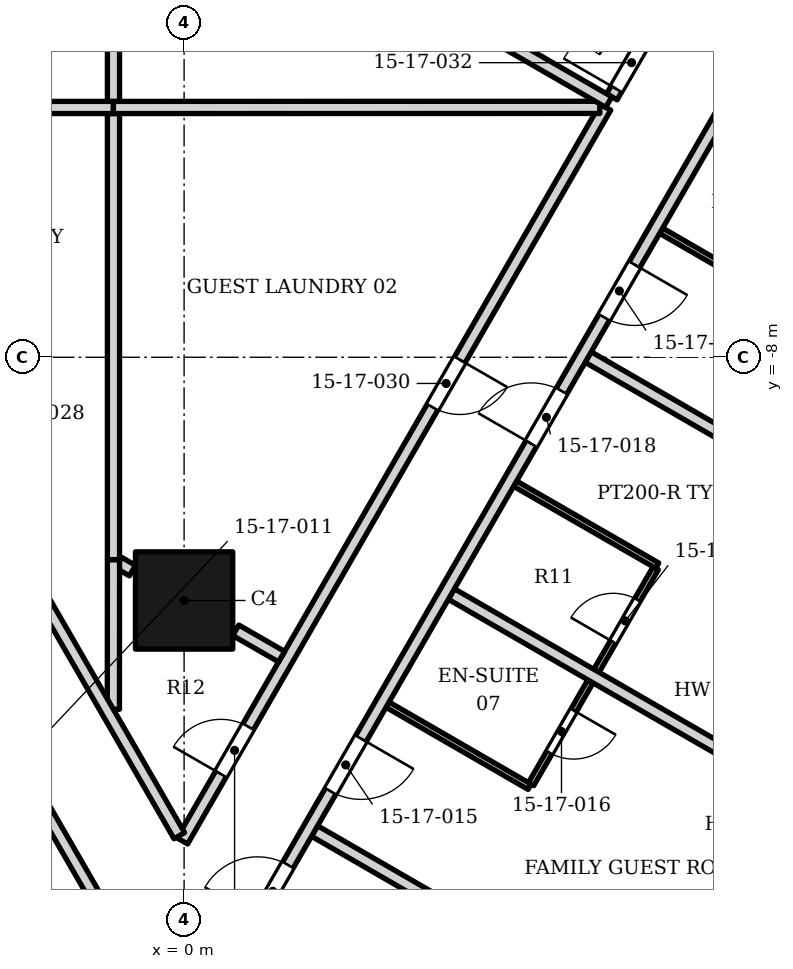
"""IFC4 building model, lengths in metres.
Left out: names, types, materials, properties, quantities, classifications, styles, units other than length and angle.
Written with IfcOpenShell. Run it as: python <this file> out.ifc"""

import sys

from ifc_helpers import new_model, si_unit, direction, frame, frame_2d, origin, origin_2d, place, context, subcontext, project, spatial, rectangle, extrude, element, fill, save


model = new_model("IFC4")
c1 = context("Model", 3, precision=1e-05, world=origin(), true_north=direction((0.0, 1.0)))
c2 = subcontext(c1, "Body", "Model", "MODEL_VIEW")
j1 = project(units=[si_unit("LENGTHUNIT", "METRE"), si_unit("PLANEANGLEUNIT", "RADIAN")], contexts=[c1])
p1 = place(None, origin())
s1 = spatial("IfcSite", under=j1, at=p1, CompositionType="ELEMENT")
p2 = place(p1, origin())
s2 = spatial("IfcBuilding", under=s1, at=p2, CompositionType="ELEMENT")
p3 = place(p2, frame((0.0, 0.0, 76.6)))
s3 = spatial("IfcBuildingStorey", under=s2, at=p3, CompositionType="ELEMENT", Elevation=76.6)
p4 = place(p3, frame((0.0, -12.0, 0.0), z_axis=(0.0, 0.0, 1.0), x_axis=(1.0, 0.0, 0.0)))
e1 = element("IfcColumn", 1, at=p4, inside=s3, PredefinedType="COLUMN", context=c2, shape_type="SweptSolid", body=[
    extrude(rectangle(XDim=1.6, YDim=1.6, at=origin_2d()), origin(), (0.0, 0.0, 1.0), 3.4),
])
p5 = place(p3, frame((8.714, -19.413, 0.0), z_axis=(0.0, 0.0, 1.0), x_axis=(0.500027713859, 0.866009402589, 0.0)))
e2 = element("IfcWall", 2, at=p5, inside=s3, PredefinedType="ELEMENTEDWALL", context=c2, shape_type="SweptSolid", body=[
    extrude(rectangle(XDim=4.2, YDim=0.2, at=frame_2d((2.1, 0.0))), origin(), (0.0, 0.0, 1.0), 2.628),
])
p6 = place(p5, frame((0.3, 0.0, 0.6)))
e3 = element("IfcOpeningElement", 3, at=p6, cuts=e2, PredefinedType="OPENING", context=c2, shape_type="SweptSolid", body=[
    extrude(rectangle(XDim=2.1, YDim=1.8, at=frame_2d((1.05, 0.9))), frame((0.0, 0.11, 0.0), z_axis=(0.0, -1.0, 0.0), x_axis=(1.0, 0.0, 0.0)), (0.0, 0.0, 1.0), 0.22),
])
p7 = place(p5, frame((2.7, 0.0, 0.0)))
e4 = element("IfcOpeningElement", 4, at=p7, cuts=e2, PredefinedType="OPENING", context=c2, shape_type="SweptSolid", body=[
    extrude(rectangle(XDim=1.2, YDim=2.4, at=frame_2d((0.6, 1.2))), frame((0.0, 0.11, 0.0), z_axis=(0.0, -1.0, 0.0), x_axis=(1.0, 0.0, 0.0)), (0.0, 0.0, 1.0), 0.22),
])
p8 = place(p3, frame((-11.206, 0.0, 0.0), z_axis=(0.0, 0.0, 1.0), x_axis=(0.500002959525, -0.866023695095, 0.0)))
e5 = element("IfcWall", 5, at=p8, inside=s3, PredefinedType="PARTITIONING", context=c2, shape_type="SweptSolid", body=[
    extrude(rectangle(XDim=22.351, YDim=0.2, at=frame_2d((11.175, 0.0))), origin(), (0.0, 0.0, 1.0), 2.242),
])
p9 = place(p8, frame((0.7, 0.0, 0.0)))
e6 = element("IfcOpeningElement", 6, at=p9, cuts=e5, PredefinedType="OPENING", context=c2, shape_type="SweptSolid", body=[
    extrude(rectangle(XDim=1.0, YDim=2.1, at=frame_2d((0.5, 1.05))), frame((0.0, 0.11, 0.0), z_axis=(0.0, -1.0, 0.0), x_axis=(1.0, 0.0, 0.0)), (0.0, 0.0, 1.0), 0.22),
])
p10 = place(p8, frame((3.1, 0.0, 0.0)))
e7 = element("IfcOpeningElement", 7, at=p10, cuts=e5, PredefinedType="OPENING", context=c2, shape_type="SweptSolid", body=[
    extrude(rectangle(XDim=1.0, YDim=2.1, at=frame_2d((0.5, 1.05))), frame((0.0, 0.11, 0.0), z_axis=(0.0, -1.0, 0.0), x_axis=(1.0, 0.0, 0.0)), (0.0, 0.0, 1.0), 0.22),
])
p11 = place(p8, frame((9.7, 0.0, 0.0)))
e8 = element("IfcOpeningElement", 8, at=p11, cuts=e5, PredefinedType="OPENING", context=c2, shape_type="SweptSolid", body=[
    extrude(rectangle(XDim=1.0, YDim=2.1, at=frame_2d((0.5, 1.05))), frame((0.0, 0.11, 0.0), z_axis=(0.0, -1.0, 0.0), x_axis=(1.0, 0.0, 0.0)), (0.0, 0.0, 1.0), 0.22),
])
p12 = place(p8, frame((12.1, 0.0, 0.0)))
e9 = element("IfcOpeningElement", 9, at=p12, cuts=e5, PredefinedType="OPENING", context=c2, shape_type="SweptSolid", body=[
    extrude(rectangle(XDim=1.0, YDim=2.1, at=frame_2d((0.5, 1.05))), frame((0.0, 0.11, 0.0), z_axis=(0.0, -1.0, 0.0), x_axis=(1.0, 0.0, 0.0)), (0.0, 0.0, 1.0), 0.22),
])
p13 = place(p8, frame((16.4, 0.0, 0.0)))
e10 = element("IfcOpeningElement", 10, at=p13, cuts=e5, PredefinedType="OPENING", context=c2, shape_type="SweptSolid", body=[
    extrude(rectangle(XDim=1.1, YDim=2.1, at=frame_2d((0.55, 1.05))), frame((0.0, 0.11, 0.0), z_axis=(0.0, -1.0, 0.0), x_axis=(1.0, 0.0, 0.0)), (0.0, 0.0, 1.0), 0.22),
])
p14 = place(p8, frame((20.925, 0.0, 0.0)))
e11 = element("IfcOpeningElement", 11, at=p14, cuts=e5, PredefinedType="OPENING", context=c2, shape_type="SweptSolid", body=[
    extrude(rectangle(XDim=1.1, YDim=2.1, at=frame_2d((0.55, 1.05))), frame((0.0, 0.11, 0.0), z_axis=(0.0, -1.0, 0.0), x_axis=(1.0, 0.0, 0.0)), (0.0, 0.0, 1.0), 0.22),
])
p15 = place(p3, frame((-0.029, -15.955, 0.0), z_axis=(0.0, 0.0, 1.0), x_axis=(0.499541892375, 0.866289730842, 0.0)))
e12 = element("IfcWall", 12, at=p15, inside=s3, PredefinedType="PARTITIONING", context=c2, shape_type="SweptSolid", body=[
    extrude(rectangle(XDim=13.93, YDim=0.2, at=frame_2d((6.965, 0.0))), origin(), (0.0, 0.0, 1.0), 2.242),
])
p16 = place(p15, frame((1.27, 0.0, 0.0)))
e13 = element("IfcOpeningElement", 13, at=p16, cuts=e12, PredefinedType="OPENING", context=c2, shape_type="SweptSolid", body=[
    extrude(rectangle(XDim=0.9, YDim=2.1, at=frame_2d((0.45, 1.05))), frame((0.0, 0.11, 0.0), z_axis=(0.0, -1.0, 0.0), x_axis=(1.0, 0.0, 0.0)), (0.0, 0.0, 1.0), 0.22),
])
p17 = place(p15, frame((8.235, 0.0, 0.0)))
e14 = element("IfcOpeningElement", 14, at=p17, cuts=e12, PredefinedType="OPENING", context=c2, shape_type="SweptSolid", body=[
    extrude(rectangle(XDim=0.9, YDim=2.1, at=frame_2d((0.45, 1.05))), frame((0.0, 0.11, 0.0), z_axis=(0.0, -1.0, 0.0), x_axis=(1.0, 0.0, 0.0)), (0.0, 0.0, 1.0), 0.22),
])
p18 = place(p3, frame((2.145, -15.791, 0.0), z_axis=(0.0, 0.0, 1.0), x_axis=(0.865906406618, -0.500206052519, 0.0)))
e15 = element("IfcWall", 15, at=p18, inside=s3, PredefinedType="PARTITIONING", context=c2, shape_type="SweptSolid", body=[
    extrude(rectangle(XDim=7.05, YDim=0.2, at=frame_2d((3.525, 0.0))), origin(), (0.0, 0.0, 1.0), 2.384),
])
p19 = place(p18, frame((4.85, 0.0, 0.0)))
e16 = element("IfcOpeningElement", 16, at=p19, cuts=e15, PredefinedType="OPENING", context=c2, shape_type="SweptSolid", body=[
    extrude(rectangle(XDim=0.9, YDim=2.1, at=frame_2d((0.45, 1.05))), frame((0.0, 0.11, 0.0), z_axis=(0.0, -1.0, 0.0), x_axis=(1.0, 0.0, 0.0)), (0.0, 0.0, 1.0), 0.22),
])
p20 = place(p3, frame((5.707, -15.021, 0.0), z_axis=(0.0, 0.0, 1.0), x_axis=(0.49995005938, 0.866054235095, 0.0)))
e17 = element("IfcWall", 17, at=p20, inside=s3, PredefinedType="PARTITIONING", context=c2, shape_type="SweptSolid", body=[
    extrude(rectangle(XDim=1.95, YDim=0.1, at=frame_2d((0.975, 0.0))), origin(), (0.0, 0.0, 1.0), 2.473),
])
p21 = place(p20, frame((0.6, 0.0, 0.0)))
e18 = element("IfcOpeningElement", 18, at=p21, cuts=e17, PredefinedType="OPENING", context=c2, shape_type="SweptSolid", body=[
    extrude(rectangle(XDim=0.8, YDim=2.1, at=frame_2d((0.4, 1.05))), frame((0.0, 0.06, 0.0), z_axis=(0.0, -1.0, 0.0), x_axis=(1.0, 0.0, 0.0)), (0.0, 0.0, 1.0), 0.12),
])
p22 = place(p3, frame((3.344, -13.713, 0.0), z_axis=(0.0, 0.0, 1.0), x_axis=(0.86571095196, -0.500544251447, 0.0)))
e19 = element("IfcWall", 19, at=p22, inside=s3, PredefinedType="PARTITIONING", context=c2, shape_type="SweptSolid", body=[
    extrude(rectangle(XDim=2.7, YDim=0.1, at=frame_2d((1.35, 0.0))), origin(), (0.0, 0.0, 1.0), 2.384),
])
p23 = place(p3, frame((6.781, -13.158, 0.0), z_axis=(0.0, 0.0, 1.0), x_axis=(0.50063639091, 0.865657671425, 0.0)))
e20 = element("IfcWall", 20, at=p23, inside=s3, PredefinedType="PARTITIONING", context=c2, shape_type="SweptSolid", body=[
    extrude(rectangle(XDim=1.95, YDim=0.1, at=frame_2d((0.975, 0.0))), origin(), (0.0, 0.0, 1.0), 2.242),
])
p24 = place(p23, frame((0.55, 0.0, 0.0)))
e21 = element("IfcOpeningElement", 21, at=p24, cuts=e20, PredefinedType="OPENING", context=c2, shape_type="SweptSolid", body=[
    extrude(rectangle(XDim=0.8, YDim=2.1, at=frame_2d((0.4, 1.05))), frame((0.0, 0.06, 0.0), z_axis=(0.0, -1.0, 0.0), x_axis=(1.0, 0.0, 0.0)), (0.0, 0.0, 1.0), 0.12),
])
p25 = place(p3, frame((0.85, -12.49, 0.0), z_axis=(0.0, 0.0, 1.0), x_axis=(0.866960927484, -0.498376113207, 0.0)))
e22 = element("IfcWall", 22, at=p25, inside=s3, PredefinedType="PARTITIONING", context=c2, shape_type="SweptSolid", body=[
    extrude(rectangle(XDim=0.869, YDim=0.2, at=frame_2d((0.435, 0.0))), origin(), (0.0, 0.0, 1.0), 3.23),
])
p26 = place(p3, frame((4.395, -11.894, 0.0), z_axis=(0.0, 0.0, 1.0), x_axis=(0.866031034943, -0.499990246421, 0.0)))
e23 = element("IfcWall", 23, at=p26, inside=s3, PredefinedType="PARTITIONING", context=c2, shape_type="SweptSolid", body=[
    extrude(rectangle(XDim=7.05, YDim=0.2, at=frame_2d((3.525, 0.0))), origin(), (0.0, 0.0, 1.0), 2.302),
])
p27 = place(p3, frame((5.443, -10.078, 0.0), z_axis=(0.0, 0.0, 1.0), x_axis=(0.866339109022, -0.499456252518, 0.0)))
e24 = element("IfcWall", 24, at=p27, inside=s3, PredefinedType="PARTITIONING", context=c2, shape_type="SweptSolid", body=[
    extrude(rectangle(XDim=2.7, YDim=0.1, at=frame_2d((1.35, 0.0))), origin(), (0.0, 0.0, 1.0), 2.242),
])
p28 = place(p3, frame((-1.075, -11.378, 0.0), z_axis=(0.0, 0.0, 1.0), x_axis=(0.863710940107, -0.50398751169, 0.0)))
e25 = element("IfcWall", 25, at=p28, inside=s3, PredefinedType="PARTITIONING", context=c2, shape_type="SweptSolid", body=[
    extrude(rectangle(XDim=0.26, YDim=0.2, at=frame_2d((0.13, 0.0))), origin(), (0.0, 0.0, 1.0), 3.23),
])
p29 = place(p3, frame((-1.163, -13.79, 0.0), z_axis=(0.0, 0.0, 1.0), x_axis=(0.000595415197, 0.99999982274, 0.0)))
e26 = element("IfcWall", 26, at=p29, inside=s3, PredefinedType="PARTITIONING", context=c2, shape_type="SweptSolid", body=[
    extrude(rectangle(XDim=2.46, YDim=0.2, at=frame_2d((1.23, 0.0))), origin(), (0.0, 0.0, 1.0), 2.45),
])
p30 = place(p3, frame((6.645, -7.997, 0.0), z_axis=(0.0, 0.0, 1.0), x_axis=(0.865891406831, -0.500232017744, 0.0)))
e27 = element("IfcWall", 27, at=p30, inside=s3, PredefinedType="PARTITIONING", context=c2, shape_type="SweptSolid", body=[
    extrude(rectangle(XDim=7.05, YDim=0.2, at=frame_2d((3.525, 0.0))), origin(), (0.0, 0.0, 1.0), 2.242),
])
p31 = place(p30, frame((4.85, 0.0, 0.0)))
e28 = element("IfcOpeningElement", 28, at=p31, cuts=e27, PredefinedType="OPENING", context=c2, shape_type="SweptSolid", body=[
    extrude(rectangle(XDim=0.9, YDim=2.1, at=frame_2d((0.45, 1.05))), frame((0.0, 0.11, 0.0), z_axis=(0.0, -1.0, 0.0), x_axis=(1.0, 0.0, 0.0)), (0.0, 0.0, 1.0), 0.22),
])
p32 = place(p3, frame((7.844, -5.918, 0.0), z_axis=(0.0, 0.0, 1.0), x_axis=(0.865671764241, -0.500612022024, 0.0)))
e29 = element("IfcWall", 29, at=p32, inside=s3, PredefinedType="PARTITIONING", context=c2, shape_type="SweptSolid", body=[
    extrude(rectangle(XDim=2.7, YDim=0.1, at=frame_2d((1.35, 0.0))), origin(), (0.0, 0.0, 1.0), 2.473),
])
p33 = place(p3, frame((-1.162, -11.327, 0.0), z_axis=(0.0, 0.0, 1.0), x_axis=(0.0, 1.0, 0.0)))
e30 = element("IfcWall", 30, at=p33, inside=s3, PredefinedType="PARTITIONING", context=c2, shape_type="SweptSolid", body=[
    extrude(rectangle(XDim=7.335, YDim=0.2, at=frame_2d((3.667, 0.0))), origin(), (0.0, 0.0, 1.0), 3.23),
])
p34 = place(p3, frame((-6.991, -3.893, 0.0), z_axis=(0.0, 0.0, 1.0), x_axis=(0.499865112403, -0.86610326717, 0.0)))
e31 = element("IfcWall", 31, at=p34, inside=s3, PredefinedType="PARTITIONING", context=c2, shape_type="SweptSolid", body=[
    extrude(rectangle(XDim=13.827, YDim=0.2, at=frame_2d((6.914, 0.0))), origin(), (0.0, 0.0, 1.0), 2.242),
])
p35 = place(p34, frame((5.377, 0.0, 0.0)))
e32 = element("IfcOpeningElement", 32, at=p35, cuts=e31, PredefinedType="OPENING", context=c2, shape_type="SweptSolid", body=[
    extrude(rectangle(XDim=0.9, YDim=2.1, at=frame_2d((0.45, 1.05))), frame((0.0, 0.11, 0.0), z_axis=(0.0, -1.0, 0.0), x_axis=(1.0, 0.0, 0.0)), (0.0, 0.0, 1.0), 0.22),
])
p36 = place(p3, frame((-6.891, -3.893, 0.0), z_axis=(0.0, 0.0, 1.0), x_axis=(1.0, 0.0, 0.0)))
e33 = element("IfcWall", 33, at=p36, inside=s3, PredefinedType="PARTITIONING", context=c2, shape_type="SweptSolid", body=[
    extrude(rectangle(XDim=5.727, YDim=0.2, at=frame_2d((2.864, 0.0))), origin(), (0.0, 0.0, 1.0), 2.242),
])
p37 = place(p3, frame((-1.162, -3.893, 0.0), z_axis=(0.0, 0.0, 1.0), x_axis=(0.999999970181, 0.000244207691, 0.0)))
e34 = element("IfcWall", 34, at=p37, inside=s3, PredefinedType="PARTITIONING", context=c2, shape_type="SweptSolid", body=[
    extrude(rectangle(XDim=7.998, YDim=0.2, at=frame_2d((3.999, 0.0))), origin(), (0.0, 0.0, 1.0), 3.23),
])
p38 = place(p3, frame((-1.162, -3.791, 0.0), z_axis=(0.0, 0.0, 1.0), x_axis=(0.0, 1.0, 0.0)))
e35 = element("IfcWall", 35, at=p38, inside=s3, PredefinedType="PARTITIONING", context=c2, shape_type="SweptSolid", body=[
    extrude(rectangle(XDim=5.743, YDim=0.2, at=frame_2d((2.872, 0.0))), origin(), (0.0, 0.0, 1.0), 3.23),
])
p39 = place(p3, frame((7.035, -3.717, 0.0), z_axis=(0.0, 0.0, 1.0), x_axis=(0.50106482324, 0.865409754342, 0.0)))
e36 = element("IfcWall", 36, at=p39, inside=s3, PredefinedType="PARTITIONING", context=c2, shape_type="SweptSolid", body=[
    extrude(rectangle(XDim=1.348, YDim=0.2, at=frame_2d((0.674, 0.0))), origin(), (0.0, 0.0, 1.0), 2.242),
])
p40 = place(p39, frame((0.148, 0.0, 0.0)))
e37 = element("IfcOpeningElement", 37, at=p40, cuts=e36, PredefinedType="OPENING", context=c2, shape_type="SweptSolid", body=[
    extrude(rectangle(XDim=1.0, YDim=2.1, at=frame_2d((0.5, 1.05))), frame((0.0, 0.11, 0.0), z_axis=(0.0, -1.0, 0.0), x_axis=(1.0, 0.0, 0.0)), (0.0, 0.0, 1.0), 0.22),
])
p41 = place(p3, frame((1.919, -0.881, 0.0), z_axis=(0.0, 0.0, 1.0), x_axis=(0.866167515178, -0.499753775024, 0.0)))
e38 = element("IfcWall", 38, at=p41, inside=s3, PredefinedType="PARTITIONING", context=c2, shape_type="SweptSolid", body=[
    extrude(rectangle(XDim=5.848, YDim=0.2, at=frame_2d((2.924, 0.0))), origin(), (0.0, 0.0, 1.0), 2.242),
])
p42 = place(p3, frame((0.859, -17.822, 0.0), z_axis=(0.0, 0.0, 1.0), x_axis=(0.500002395808, 0.866024020559, 0.0)))
e39 = element("IfcWall", 39, at=p42, inside=s3, PredefinedType="PARTITIONING", context=c2, shape_type="SweptSolid", body=[
    extrude(rectangle(XDim=23.0, YDim=0.2, at=frame_2d((11.5, 0.0))), origin(), (0.0, 0.0, 1.0), 2.242),
])
p43 = place(p42, frame((0.7, 0.0, 0.0)))
e40 = element("IfcOpeningElement", 40, at=p43, cuts=e39, PredefinedType="OPENING", context=c2, shape_type="SweptSolid", body=[
    extrude(rectangle(XDim=1.0, YDim=2.1, at=frame_2d((0.5, 1.05))), frame((0.0, 0.11, 0.0), z_axis=(0.0, -1.0, 0.0), x_axis=(1.0, 0.0, 0.0)), (0.0, 0.0, 1.0), 0.22),
])
p44 = place(p42, frame((3.1, 0.0, 0.0)))
e41 = element("IfcOpeningElement", 41, at=p44, cuts=e39, PredefinedType="OPENING", context=c2, shape_type="SweptSolid", body=[
    extrude(rectangle(XDim=1.0, YDim=2.1, at=frame_2d((0.5, 1.05))), frame((0.0, 0.11, 0.0), z_axis=(0.0, -1.0, 0.0), x_axis=(1.0, 0.0, 0.0)), (0.0, 0.0, 1.0), 0.22),
])
p45 = place(p42, frame((9.7, 0.0, 0.0)))
e42 = element("IfcOpeningElement", 42, at=p45, cuts=e39, PredefinedType="OPENING", context=c2, shape_type="SweptSolid", body=[
    extrude(rectangle(XDim=1.0, YDim=2.1, at=frame_2d((0.5, 1.05))), frame((0.0, 0.11, 0.0), z_axis=(0.0, -1.0, 0.0), x_axis=(1.0, 0.0, 0.0)), (0.0, 0.0, 1.0), 0.22),
])
p46 = place(p42, frame((12.1, 0.0, 0.0)))
e43 = element("IfcOpeningElement", 43, at=p46, cuts=e39, PredefinedType="OPENING", context=c2, shape_type="SweptSolid", body=[
    extrude(rectangle(XDim=1.0, YDim=2.1, at=frame_2d((0.5, 1.05))), frame((0.0, 0.11, 0.0), z_axis=(0.0, -1.0, 0.0), x_axis=(1.0, 0.0, 0.0)), (0.0, 0.0, 1.0), 0.22),
])
p47 = place(p42, frame((16.6, 0.0, 0.0)))
e44 = element("IfcOpeningElement", 44, at=p47, cuts=e39, PredefinedType="OPENING", context=c2, shape_type="SweptSolid", body=[
    extrude(rectangle(XDim=1.0, YDim=2.1, at=frame_2d((0.5, 1.05))), frame((0.0, 0.11, 0.0), z_axis=(0.0, -1.0, 0.0), x_axis=(1.0, 0.0, 0.0)), (0.0, 0.0, 1.0), 0.22),
])
p48 = place(p43, origin())
e45 = element("IfcDoor", 45, at=p48, inside=s3, OperationType="SINGLE_SWING_LEFT", PredefinedType="DOOR", context=c2, shape_type="SweptSolid", body=[
    extrude(rectangle(XDim=1.0, YDim=2.1, at=frame_2d((0.5, 1.05))), frame((0.0, 0.025, 0.0), z_axis=(0.0, -1.0, 0.0), x_axis=(1.0, 0.0, 0.0)), (0.0, 0.0, 1.0), 0.05),
])
fill(e40, e45)
p49 = place(p44, origin())
e46 = element("IfcDoor", 46, at=p49, inside=s3, OperationType="SINGLE_SWING_RIGHT", PredefinedType="DOOR", context=c2, shape_type="SweptSolid", body=[
    extrude(rectangle(XDim=1.0, YDim=2.1, at=frame_2d((0.5, 1.05))), frame((0.0, 0.025, 0.0), z_axis=(0.0, -1.0, 0.0), x_axis=(1.0, 0.0, 0.0)), (0.0, 0.0, 1.0), 0.05),
])
fill(e41, e46)
p50 = place(p21, origin())
e47 = element("IfcDoor", 47, at=p50, inside=s3, OperationType="SINGLE_SWING_RIGHT", PredefinedType="DOOR", context=c2, shape_type="SweptSolid", body=[
    extrude(rectangle(XDim=0.8, YDim=2.1, at=frame_2d((0.4, 1.05))), frame((0.0, 0.025, 0.0), z_axis=(0.0, -1.0, 0.0), x_axis=(1.0, 0.0, 0.0)), (0.0, 0.0, 1.0), 0.05),
])
fill(e18, e47)
p51 = place(p45, origin())
e48 = element("IfcDoor", 48, at=p51, inside=s3, OperationType="SINGLE_SWING_LEFT", PredefinedType="DOOR", context=c2, shape_type="SweptSolid", body=[
    extrude(rectangle(XDim=1.0, YDim=2.1, at=frame_2d((0.5, 1.05))), frame((0.0, 0.025, 0.0), z_axis=(0.0, -1.0, 0.0), x_axis=(1.0, 0.0, 0.0)), (0.0, 0.0, 1.0), 0.05),
])
fill(e42, e48)
p52 = place(p24, origin())
e49 = element("IfcDoor", 49, at=p52, inside=s3, OperationType="SINGLE_SWING_LEFT", PredefinedType="DOOR", context=c2, shape_type="SweptSolid", body=[
    extrude(rectangle(XDim=0.8, YDim=2.1, at=frame_2d((0.4, 1.05))), frame((0.0, 0.025, 0.0), z_axis=(0.0, -1.0, 0.0), x_axis=(1.0, 0.0, 0.0)), (0.0, 0.0, 1.0), 0.05),
])
fill(e21, e49)
p53 = place(p46, origin())
e50 = element("IfcDoor", 50, at=p53, inside=s3, OperationType="SINGLE_SWING_RIGHT", PredefinedType="DOOR", context=c2, shape_type="SweptSolid", body=[
    extrude(rectangle(XDim=1.0, YDim=2.1, at=frame_2d((0.5, 1.05))), frame((0.0, 0.025, 0.0), z_axis=(0.0, -1.0, 0.0), x_axis=(1.0, 0.0, 0.0)), (0.0, 0.0, 1.0), 0.05),
])
fill(e43, e50)
p54 = place(p16, origin())
e51 = element("IfcDoor", 51, at=p54, inside=s3, OperationType="SINGLE_SWING_LEFT", PredefinedType="DOOR", context=c2, shape_type="SweptSolid", body=[
    extrude(rectangle(XDim=0.9, YDim=2.1, at=frame_2d((0.45, 1.05))), frame((0.0, 0.025, 0.0), z_axis=(0.0, -1.0, 0.0), x_axis=(1.0, 0.0, 0.0)), (0.0, 0.0, 1.0), 0.05),
])
fill(e13, e51)
p55 = place(p17, origin())
e52 = element("IfcDoor", 52, at=p55, inside=s3, OperationType="SINGLE_SWING_RIGHT", PredefinedType="DOOR", context=c2, shape_type="SweptSolid", body=[
    extrude(rectangle(XDim=0.9, YDim=2.1, at=frame_2d((0.45, 1.05))), frame((0.0, 0.025, 0.0), z_axis=(0.0, -1.0, 0.0), x_axis=(1.0, 0.0, 0.0)), (0.0, 0.0, 1.0), 0.05),
])
fill(e14, e52)
p56 = place(p40, origin())
e53 = element("IfcDoor", 53, at=p56, inside=s3, OperationType="SINGLE_SWING_LEFT", PredefinedType="DOOR", context=c2, shape_type="SweptSolid", body=[
    extrude(rectangle(XDim=1.0, YDim=2.1, at=frame_2d((0.5, 1.05))), frame((0.0, 0.025, 0.0), z_axis=(0.0, -1.0, 0.0), x_axis=(1.0, 0.0, 0.0)), (0.0, 0.0, 1.0), 0.05),
])
fill(e37, e53)
save(model, sys.argv[1])
